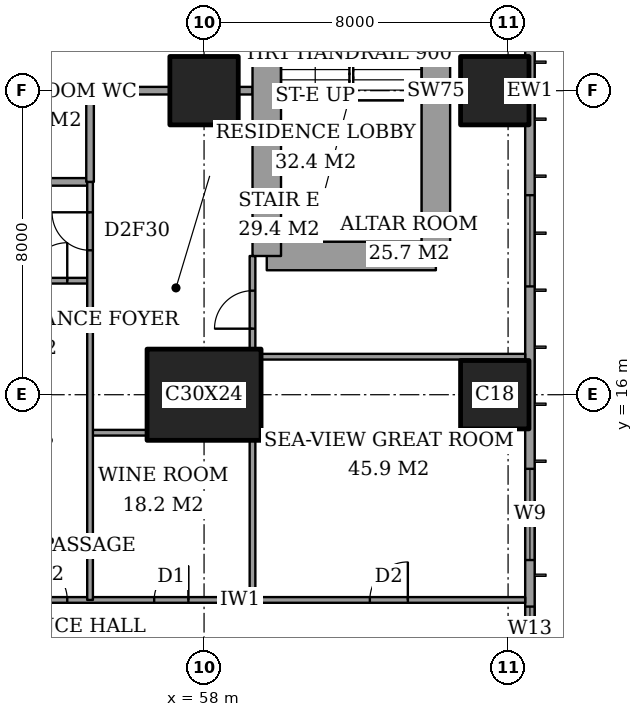
"""IFC4 building model, lengths in metres.
Left out: names, types, materials, properties, quantities, classifications, styles, units other than length and angle.
Written with IfcOpenShell. Run it as: python <this file> out.ifc"""

import sys

from ifc_helpers import new_model, si_unit, direction, frame, frame_2d, origin, origin_2d, place, context, subcontext, project, spatial, rectangle, extrude, element, fill, save


model = new_model("IFC4")
c1 = context("Model", 3, precision=1e-05, world=origin(), true_north=direction((0.0, 1.0)))
c2 = subcontext(c1, "Body", "Model", "MODEL_VIEW")
j1 = project(units=[si_unit("LENGTHUNIT", "METRE"), si_unit("PLANEANGLEUNIT", "RADIAN")], contexts=[c1])
p1 = place(None, origin())
s1 = spatial("IfcSite", under=j1, at=p1, CompositionType="ELEMENT")
p2 = place(p1, origin())
s2 = spatial("IfcBuilding", under=s1, at=p2, CompositionType="ELEMENT")
p3 = place(p2, frame((0.0, 0.0, 193.0)))
s3 = spatial("IfcBuildingStorey", under=s2, at=p3, CompositionType="ELEMENT", Elevation=193.0)
p4 = place(p3, frame((58.0, 16.0, 0.0), z_axis=(0.0, 0.0, 1.0), x_axis=(1.0, 0.0, 0.0)))
e1 = element("IfcColumn", 1, at=p4, inside=s3, PredefinedType="COLUMN", context=c2, shape_type="SweptSolid", body=[
    extrude(rectangle(XDim=3.0, YDim=2.4, at=origin_2d()), origin(), (0.0, 0.0, 1.0), 3.6),
])
for number, where, z_axis, x_axis in (
    (2, (58.0, 24.0, 0.0), (0.0, 0.0, 1.0), (1.0, 0.0, 0.0)),
    (3, (65.65, 16.0, 0.0), (0.0, 0.0, 1.0), (1.0, 0.0, 0.0)),
    (4, (65.65, 24.0, 0.0), (0.0, 0.0, 1.0), (1.0, 0.0, 0.0)),
):
    element("IfcColumn", number, at=place(p3, frame(where, z_axis=z_axis, x_axis=x_axis)), inside=s3, PredefinedType="COLUMN", context=c2, shape_type="SweptSolid", body=[
        extrude(rectangle(XDim=1.8, YDim=1.8, at=origin_2d()), origin(), (0.0, 0.0, 1.0), 3.6),
    ])
p5 = place(p3, frame((59.65, 19.65, 0.0), z_axis=(0.0, 0.0, 1.0), x_axis=(1.0, 0.0, 0.0)))
e5 = element("IfcWall", 5, at=p5, inside=s3, PredefinedType="SHEAR", context=c2, shape_type="SweptSolid", body=[
    extrude(rectangle(XDim=4.45, YDim=0.75, at=frame_2d((2.225, 0.0))), origin(), (0.0, 0.0, 1.0), 3.6),
])
p6 = place(p3, frame((64.1, 19.65, 0.0), z_axis=(0.0, 0.0, 1.0), x_axis=(0.0, 1.0, 0.0)))
e6 = element("IfcWall", 6, at=p6, inside=s3, PredefinedType="SHEAR", context=c2, shape_type="SweptSolid", body=[
    extrude(rectangle(XDim=8.7, YDim=0.75, at=frame_2d((4.35, 0.0))), origin(), (0.0, 0.0, 1.0), 3.6),
])
p7 = place(p3, frame((59.65, 28.35, 0.0), z_axis=(0.0, 0.0, 1.0), x_axis=(0.0, -1.0, 0.0)))
e7 = element("IfcWall", 7, at=p7, inside=s3, PredefinedType="SHEAR", context=c2, shape_type="SweptSolid", body=[
    extrude(rectangle(XDim=8.7, YDim=0.75, at=frame_2d((4.35, 0.0))), origin(), (0.0, 0.0, 1.0), 3.6),
])
p8 = place(p7, frame((0.975, 0.0, 0.0)))
e8 = element("IfcOpeningElement", 8, at=p8, cuts=e7, PredefinedType="OPENING", context=c2, shape_type="SweptSolid", body=[
    extrude(rectangle(XDim=1.0, YDim=2.1, at=frame_2d((0.5, 1.05))), frame((0.0, 0.385, 0.0), z_axis=(0.0, -1.0, 0.0), x_axis=(1.0, 0.0, 0.0)), (0.0, 0.0, 1.0), 0.77),
])
p9 = place(p3, frame((66.575, 3.175, 0.0), z_axis=(0.0, 0.0, 1.0), x_axis=(0.0, 1.0, 0.0)))
e9 = element("IfcWall", 9, at=p9, inside=s3, PredefinedType="SOLIDWALL", context=c2, shape_type="SweptSolid", body=[
    extrude(rectangle(XDim=41.65, YDim=0.25, at=frame_2d((20.825, 0.0))), origin(), (0.0, 0.0, 1.0), 3.6),
])
p10 = place(p9, frame((0.825, 0.0, 0.2)))
e10 = element("IfcOpeningElement", 10, at=p10, cuts=e9, PredefinedType="OPENING", context=c2, shape_type="SweptSolid", body=[
    extrude(rectangle(XDim=2.4, YDim=2.4, at=frame_2d((1.2, 1.2))), frame((0.0, 0.135, 0.0), z_axis=(0.0, -1.0, 0.0), x_axis=(1.0, 0.0, 0.0)), (0.0, 0.0, 1.0), 0.27),
])
p11 = place(p9, frame((6.05, 0.0, 0.2)))
e11 = element("IfcOpeningElement", 11, at=p11, cuts=e9, PredefinedType="OPENING", context=c2, shape_type="SweptSolid", body=[
    extrude(rectangle(XDim=1.2, YDim=2.4, at=frame_2d((0.6, 1.2))), frame((0.0, 0.135, 0.0), z_axis=(0.0, -1.0, 0.0), x_axis=(1.0, 0.0, 0.0)), (0.0, 0.0, 1.0), 0.27),
])
p12 = place(p9, frame((8.475, 0.0, 0.2)))
e12 = element("IfcOpeningElement", 12, at=p12, cuts=e9, PredefinedType="OPENING", context=c2, shape_type="SweptSolid", body=[
    extrude(rectangle(XDim=2.4, YDim=2.4, at=frame_2d((1.2, 1.2))), frame((0.0, 0.135, 0.0), z_axis=(0.0, -1.0, 0.0), x_axis=(1.0, 0.0, 0.0)), (0.0, 0.0, 1.0), 0.27),
])
p13 = place(p9, frame((15.675, 0.0, 0.2)))
e13 = element("IfcOpeningElement", 13, at=p13, cuts=e9, PredefinedType="OPENING", context=c2, shape_type="SweptSolid", body=[
    extrude(rectangle(XDim=2.4, YDim=2.4, at=frame_2d((1.2, 1.2))), frame((0.0, 0.135, 0.0), z_axis=(0.0, -1.0, 0.0), x_axis=(1.0, 0.0, 0.0)), (0.0, 0.0, 1.0), 0.27),
])
p14 = place(p9, frame((23.625, 0.0, 0.2)))
e14 = element("IfcOpeningElement", 14, at=p14, cuts=e9, PredefinedType="OPENING", context=c2, shape_type="SweptSolid", body=[
    extrude(rectangle(XDim=2.4, YDim=2.4, at=frame_2d((1.2, 1.2))), frame((0.0, 0.135, 0.0), z_axis=(0.0, -1.0, 0.0), x_axis=(1.0, 0.0, 0.0)), (0.0, 0.0, 1.0), 0.27),
])
p15 = place(p9, frame((30.775, 0.0, 0.2)))
e15 = element("IfcOpeningElement", 15, at=p15, cuts=e9, PredefinedType="OPENING", context=c2, shape_type="SweptSolid", body=[
    extrude(rectangle(XDim=2.4, YDim=2.4, at=frame_2d((1.2, 1.2))), frame((0.0, 0.135, 0.0), z_axis=(0.0, -1.0, 0.0), x_axis=(1.0, 0.0, 0.0)), (0.0, 0.0, 1.0), 0.27),
])
p16 = place(p9, frame((34.55, 0.0, 0.2)))
e16 = element("IfcOpeningElement", 16, at=p16, cuts=e9, PredefinedType="OPENING", context=c2, shape_type="SweptSolid", body=[
    extrude(rectangle(XDim=1.2, YDim=2.4, at=frame_2d((0.6, 1.2))), frame((0.0, 0.135, 0.0), z_axis=(0.0, -1.0, 0.0), x_axis=(1.0, 0.0, 0.0)), (0.0, 0.0, 1.0), 0.27),
])
p17 = place(p9, frame((38.425, 0.0, 0.2)))
e17 = element("IfcOpeningElement", 17, at=p17, cuts=e9, PredefinedType="OPENING", context=c2, shape_type="SweptSolid", body=[
    extrude(rectangle(XDim=2.4, YDim=2.4, at=frame_2d((1.2, 1.2))), frame((0.0, 0.135, 0.0), z_axis=(0.0, -1.0, 0.0), x_axis=(1.0, 0.0, 0.0)), (0.0, 0.0, 1.0), 0.27),
])
p18 = place(p3, frame((41.439, 10.6, 0.0), z_axis=(0.0, 0.0, 1.0), x_axis=(1.0, 0.0, 0.0)))
e18 = element("IfcWall", 18, at=p18, inside=s3, PredefinedType="PARTITIONING", context=c2, shape_type="SweptSolid", body=[
    extrude(rectangle(XDim=25.011, YDim=0.15, at=frame_2d((12.505, 0.0))), origin(), (0.0, 0.0, 1.0), 3.35),
])
p19 = place(p18, frame((11.961, 0.0, 0.0)))
e19 = element("IfcOpeningElement", 19, at=p19, cuts=e18, PredefinedType="OPENING", context=c2, shape_type="SweptSolid", body=[
    extrude(rectangle(XDim=1.0, YDim=2.1, at=frame_2d((0.5, 1.05))), frame((0.0, 0.085, 0.0), z_axis=(0.0, -1.0, 0.0), x_axis=(1.0, 0.0, 0.0)), (0.0, 0.0, 1.0), 0.17),
])
p20 = place(p18, frame((20.924, 0.0, 0.0)))
e20 = element("IfcOpeningElement", 20, at=p20, cuts=e18, PredefinedType="OPENING", context=c2, shape_type="SweptSolid", body=[
    extrude(rectangle(XDim=1.0, YDim=2.1, at=frame_2d((0.5, 1.05))), frame((0.0, 0.085, 0.0), z_axis=(0.0, -1.0, 0.0), x_axis=(1.0, 0.0, 0.0)), (0.0, 0.0, 1.0), 0.17),
])
p21 = place(p18, frame((15.249, 0.0, 0.0)))
e21 = element("IfcOpeningElement", 21, at=p21, cuts=e18, PredefinedType="OPENING", context=c2, shape_type="SweptSolid", body=[
    extrude(rectangle(XDim=0.9, YDim=2.1, at=frame_2d((0.45, 1.05))), frame((0.0, 0.085, 0.0), z_axis=(0.0, -1.0, 0.0), x_axis=(1.0, 0.0, 0.0)), (0.0, 0.0, 1.0), 0.17),
])
p22 = place(p18, frame((9.661, 0.0, 0.0)))
e22 = element("IfcOpeningElement", 22, at=p22, cuts=e18, PredefinedType="OPENING", context=c2, shape_type="SweptSolid", body=[
    extrude(rectangle(XDim=1.0, YDim=2.1, at=frame_2d((0.5, 1.05))), frame((0.0, 0.085, 0.0), z_axis=(0.0, -1.0, 0.0), x_axis=(1.0, 0.0, 0.0)), (0.0, 0.0, 1.0), 0.17),
])
p23 = place(p18, frame((7.311, 0.0, 0.0)))
e23 = element("IfcOpeningElement", 23, at=p23, cuts=e18, PredefinedType="OPENING", context=c2, shape_type="SweptSolid", body=[
    extrude(rectangle(XDim=0.9, YDim=2.1, at=frame_2d((0.45, 1.05))), frame((0.0, 0.085, 0.0), z_axis=(0.0, -1.0, 0.0), x_axis=(1.0, 0.0, 0.0)), (0.0, 0.0, 1.0), 0.17),
])
p24 = place(p18, frame((2.836, 0.0, 0.0)))
e24 = element("IfcOpeningElement", 24, at=p24, cuts=e18, PredefinedType="OPENING", context=c2, shape_type="SweptSolid", body=[
    extrude(rectangle(XDim=1.0, YDim=2.1, at=frame_2d((0.5, 1.05))), frame((0.0, 0.085, 0.0), z_axis=(0.0, -1.0, 0.0), x_axis=(1.0, 0.0, 0.0)), (0.0, 0.0, 1.0), 0.17),
])
p25 = place(p3, frame((55.0, 15.0, 0.0), z_axis=(0.0, 0.0, 1.0), x_axis=(1.0, 0.0, 0.0)))
e25 = element("IfcWall", 25, at=p25, inside=s3, PredefinedType="PARTITIONING", context=c2, shape_type="SweptSolid", body=[
    extrude(rectangle(XDim=1.5, YDim=0.15, at=frame_2d((0.75, 0.0))), origin(), (0.0, 0.0, 1.0), 3.35),
])
p26 = place(p3, frame((59.5, 17.0, 0.0), z_axis=(0.0, 0.0, 1.0), x_axis=(1.0, 0.0, 0.0)))
e26 = element("IfcWall", 26, at=p26, inside=s3, PredefinedType="PARTITIONING", context=c2, shape_type="SweptSolid", body=[
    extrude(rectangle(XDim=6.95, YDim=0.15, at=frame_2d((3.475, 0.0))), origin(), (0.0, 0.0, 1.0), 3.35),
])
p27 = place(p3, frame((51.6, 19.0, 0.0), z_axis=(0.0, 0.0, 1.0), x_axis=(1.0, 0.0, 0.0)))
e27 = element("IfcWall", 27, at=p27, inside=s3, PredefinedType="PARTITIONING", context=c2, shape_type="SweptSolid", body=[
    extrude(rectangle(XDim=3.4, YDim=0.15, at=frame_2d((1.7, 0.0))), origin(), (0.0, 0.0, 1.0), 3.35),
])
p28 = place(p27, frame((1.8, 0.0, 0.0)))
e28 = element("IfcOpeningElement", 28, at=p28, cuts=e27, PredefinedType="OPENING", context=c2, shape_type="SweptSolid", body=[
    extrude(rectangle(XDim=1.0, YDim=2.1, at=frame_2d((0.5, 1.05))), frame((0.0, 0.085, 0.0), z_axis=(0.0, -1.0, 0.0), x_axis=(1.0, 0.0, 0.0)), (0.0, 0.0, 1.0), 0.17),
])
p29 = place(p3, frame((51.2, 21.6, 0.0), z_axis=(0.0, 0.0, 1.0), x_axis=(1.0, 0.0, 0.0)))
e29 = element("IfcWall", 29, at=p29, inside=s3, PredefinedType="PARTITIONING", context=c2, shape_type="SweptSolid", body=[
    extrude(rectangle(XDim=3.8, YDim=0.2, at=frame_2d((1.9, 0.0))), origin(), (0.0, 0.0, 1.0), 3.35),
])
p30 = place(p29, frame((1.45, 0.0, 0.0)))
e30 = element("IfcOpeningElement", 30, at=p30, cuts=e29, PredefinedType="OPENING", context=c2, shape_type="SweptSolid", body=[
    extrude(rectangle(XDim=0.9, YDim=2.1, at=frame_2d((0.45, 1.05))), frame((0.0, 0.11, 0.0), z_axis=(0.0, -1.0, 0.0), x_axis=(1.0, 0.0, 0.0)), (0.0, 0.0, 1.0), 0.22),
])
p31 = place(p3, frame((50.9, 24.0, 0.0), z_axis=(0.0, 0.0, 1.0), x_axis=(1.0, 0.0, 0.0)))
e31 = element("IfcWall", 31, at=p31, inside=s3, PredefinedType="PARTITIONING", context=c2, shape_type="SweptSolid", body=[
    extrude(rectangle(XDim=6.2, YDim=0.2, at=frame_2d((3.1, 0.0))), origin(), (0.0, 0.0, 1.0), 3.35),
])
p32 = place(p3, frame((58.9, 24.0, 0.0), z_axis=(0.0, 0.0, 1.0), x_axis=(1.0, 0.0, 0.0)))
e32 = element("IfcWall", 32, at=p32, inside=s3, PredefinedType="PARTITIONING", context=c2, shape_type="SweptSolid", body=[
    extrude(rectangle(XDim=0.375, YDim=0.2, at=frame_2d((0.188, 0.0))), origin(), (0.0, 0.0, 1.0), 3.35),
])
p33 = place(p3, frame((55.0, 21.6, 0.0), z_axis=(0.0, 0.0, 1.0), x_axis=(0.0, 1.0, 0.0)))
e33 = element("IfcWall", 33, at=p33, inside=s3, PredefinedType="PARTITIONING", context=c2, shape_type="SweptSolid", body=[
    extrude(rectangle(XDim=2.4, YDim=0.2, at=frame_2d((1.2, 0.0))), origin(), (0.0, 0.0, 1.0), 3.35),
])
p34 = place(p3, frame((55.0, 10.6, 0.0), z_axis=(0.0, 0.0, 1.0), x_axis=(0.0, 1.0, 0.0)))
e34 = element("IfcWall", 34, at=p34, inside=s3, PredefinedType="PARTITIONING", context=c2, shape_type="SweptSolid", body=[
    extrude(rectangle(XDim=11.0, YDim=0.15, at=frame_2d((5.5, 0.0))), origin(), (0.0, 0.0, 1.0), 3.35),
])
p35 = place(p34, frame((9.2, 0.0, 0.0)))
e35 = element("IfcOpeningElement", 35, at=p35, cuts=e34, PredefinedType="OPENING", context=c2, shape_type="SweptSolid", body=[
    extrude(rectangle(XDim=1.0, YDim=2.1, at=frame_2d((0.5, 1.05))), frame((0.0, 0.085, 0.0), z_axis=(0.0, -1.0, 0.0), x_axis=(1.0, 0.0, 0.0)), (0.0, 0.0, 1.0), 0.17),
])
p36 = place(p3, frame((59.275, 10.6, 0.0), z_axis=(0.0, 0.0, 1.0), x_axis=(0.0, 1.0, 0.0)))
e36 = element("IfcWall", 36, at=p36, inside=s3, PredefinedType="PARTITIONING", context=c2, shape_type="SweptSolid", body=[
    extrude(rectangle(XDim=4.2, YDim=0.15, at=frame_2d((2.1, 0.0))), origin(), (0.0, 0.0, 1.0), 3.35),
])
p37 = place(p3, frame((59.275, 17.2, 0.0), z_axis=(0.0, 0.0, 1.0), x_axis=(0.0, 1.0, 0.0)))
e37 = element("IfcWall", 37, at=p37, inside=s3, PredefinedType="PARTITIONING", context=c2, shape_type="SweptSolid", body=[
    extrude(rectangle(XDim=2.45, YDim=0.15, at=frame_2d((1.225, 0.0))), origin(), (0.0, 0.0, 1.0), 3.35),
])
p38 = place(p37, frame((0.538, 0.0, 0.0)))
e38 = element("IfcOpeningElement", 38, at=p38, cuts=e37, PredefinedType="OPENING", context=c2, shape_type="SweptSolid", body=[
    extrude(rectangle(XDim=1.0, YDim=2.1, at=frame_2d((0.5, 1.05))), frame((0.0, 0.085, 0.0), z_axis=(0.0, -1.0, 0.0), x_axis=(1.0, 0.0, 0.0)), (0.0, 0.0, 1.0), 0.17),
])
p39 = place(p11, origin())
e39 = element("IfcWindow", 39, at=p39, inside=s3, PartitioningType="SINGLE_PANEL", PredefinedType="WINDOW", context=c2, shape_type="SweptSolid", body=[
    extrude(rectangle(XDim=1.2, YDim=2.4, at=frame_2d((0.6, 1.2))), frame((0.0, 0.03, 0.0), z_axis=(0.0, -1.0, 0.0), x_axis=(1.0, 0.0, 0.0)), (0.0, 0.0, 1.0), 0.06),
])
fill(e11, e39)
p40 = place(p12, origin())
e40 = element("IfcWindow", 40, at=p40, inside=s3, PartitioningType="SINGLE_PANEL", PredefinedType="WINDOW", context=c2, shape_type="SweptSolid", body=[
    extrude(rectangle(XDim=2.4, YDim=2.4, at=frame_2d((1.2, 1.2))), frame((0.0, 0.03, 0.0), z_axis=(0.0, -1.0, 0.0), x_axis=(1.0, 0.0, 0.0)), (0.0, 0.0, 1.0), 0.06),
])
fill(e12, e40)
p41 = place(p13, origin())
e41 = element("IfcWindow", 41, at=p41, inside=s3, PartitioningType="SINGLE_PANEL", PredefinedType="WINDOW", context=c2, shape_type="SweptSolid", body=[
    extrude(rectangle(XDim=2.4, YDim=2.4, at=frame_2d((1.2, 1.2))), frame((0.0, 0.03, 0.0), z_axis=(0.0, -1.0, 0.0), x_axis=(1.0, 0.0, 0.0)), (0.0, 0.0, 1.0), 0.06),
])
fill(e13, e41)
p42 = place(p19, origin())
e42 = element("IfcDoor", 42, at=p42, inside=s3, OperationType="SINGLE_SWING_RIGHT", PredefinedType="DOOR", context=c2, shape_type="SweptSolid", body=[
    extrude(rectangle(XDim=1.0, YDim=2.1, at=frame_2d((0.5, 1.05))), frame((0.0, 0.025, 0.0), z_axis=(0.0, -1.0, 0.0), x_axis=(1.0, 0.0, 0.0)), (0.0, 0.0, 1.0), 0.05),
])
fill(e19, e42)
p43 = place(p20, origin())
e43 = element("IfcDoor", 43, at=p43, inside=s3, OperationType="SINGLE_SWING_LEFT", PredefinedType="DOOR", context=c2, shape_type="SweptSolid", body=[
    extrude(rectangle(XDim=1.0, YDim=2.1, at=frame_2d((0.5, 1.05))), frame((0.0, 0.025, 0.0), z_axis=(0.0, -1.0, 0.0), x_axis=(1.0, 0.0, 0.0)), (0.0, 0.0, 1.0), 0.05),
])
fill(e20, e43)
p44 = place(p38, origin())
e44 = element("IfcDoor", 44, at=p44, inside=s3, OperationType="SINGLE_SWING_RIGHT", PredefinedType="DOOR", context=c2, shape_type="SweptSolid", body=[
    extrude(rectangle(XDim=1.0, YDim=2.1, at=frame_2d((0.5, 1.05))), frame((0.0, 0.025, 0.0), z_axis=(0.0, -1.0, 0.0), x_axis=(1.0, 0.0, 0.0)), (0.0, 0.0, 1.0), 0.05),
])
fill(e38, e44)
p45 = place(p21, origin())
e45 = element("IfcDoor", 45, at=p45, inside=s3, OperationType="SINGLE_SWING_LEFT", PredefinedType="DOOR", context=c2, shape_type="SweptSolid", body=[
    extrude(rectangle(XDim=0.9, YDim=2.1, at=frame_2d((0.45, 1.05))), frame((0.0, 0.025, 0.0), z_axis=(0.0, -1.0, 0.0), x_axis=(1.0, 0.0, 0.0)), (0.0, 0.0, 1.0), 0.05),
])
fill(e21, e45)
p46 = place(p35, origin())
e46 = element("IfcDoor", 46, at=p46, inside=s3, OperationType="SINGLE_SWING_LEFT", PredefinedType="DOOR", context=c2, shape_type="SweptSolid", body=[
    extrude(rectangle(XDim=1.0, YDim=2.1, at=frame_2d((0.5, 1.05))), frame((0.0, 0.025, 0.0), z_axis=(0.0, -1.0, 0.0), x_axis=(1.0, 0.0, 0.0)), (0.0, 0.0, 1.0), 0.05),
])
fill(e35, e46)
p47 = place(p28, origin())
e47 = element("IfcDoor", 47, at=p47, inside=s3, OperationType="SINGLE_SWING_LEFT", PredefinedType="DOOR", context=c2, shape_type="SweptSolid", body=[
    extrude(rectangle(XDim=1.0, YDim=2.1, at=frame_2d((0.5, 1.05))), frame((0.0, 0.025, 0.0), z_axis=(0.0, -1.0, 0.0), x_axis=(1.0, 0.0, 0.0)), (0.0, 0.0, 1.0), 0.05),
])
fill(e28, e47)
save(model, sys.argv[1])
